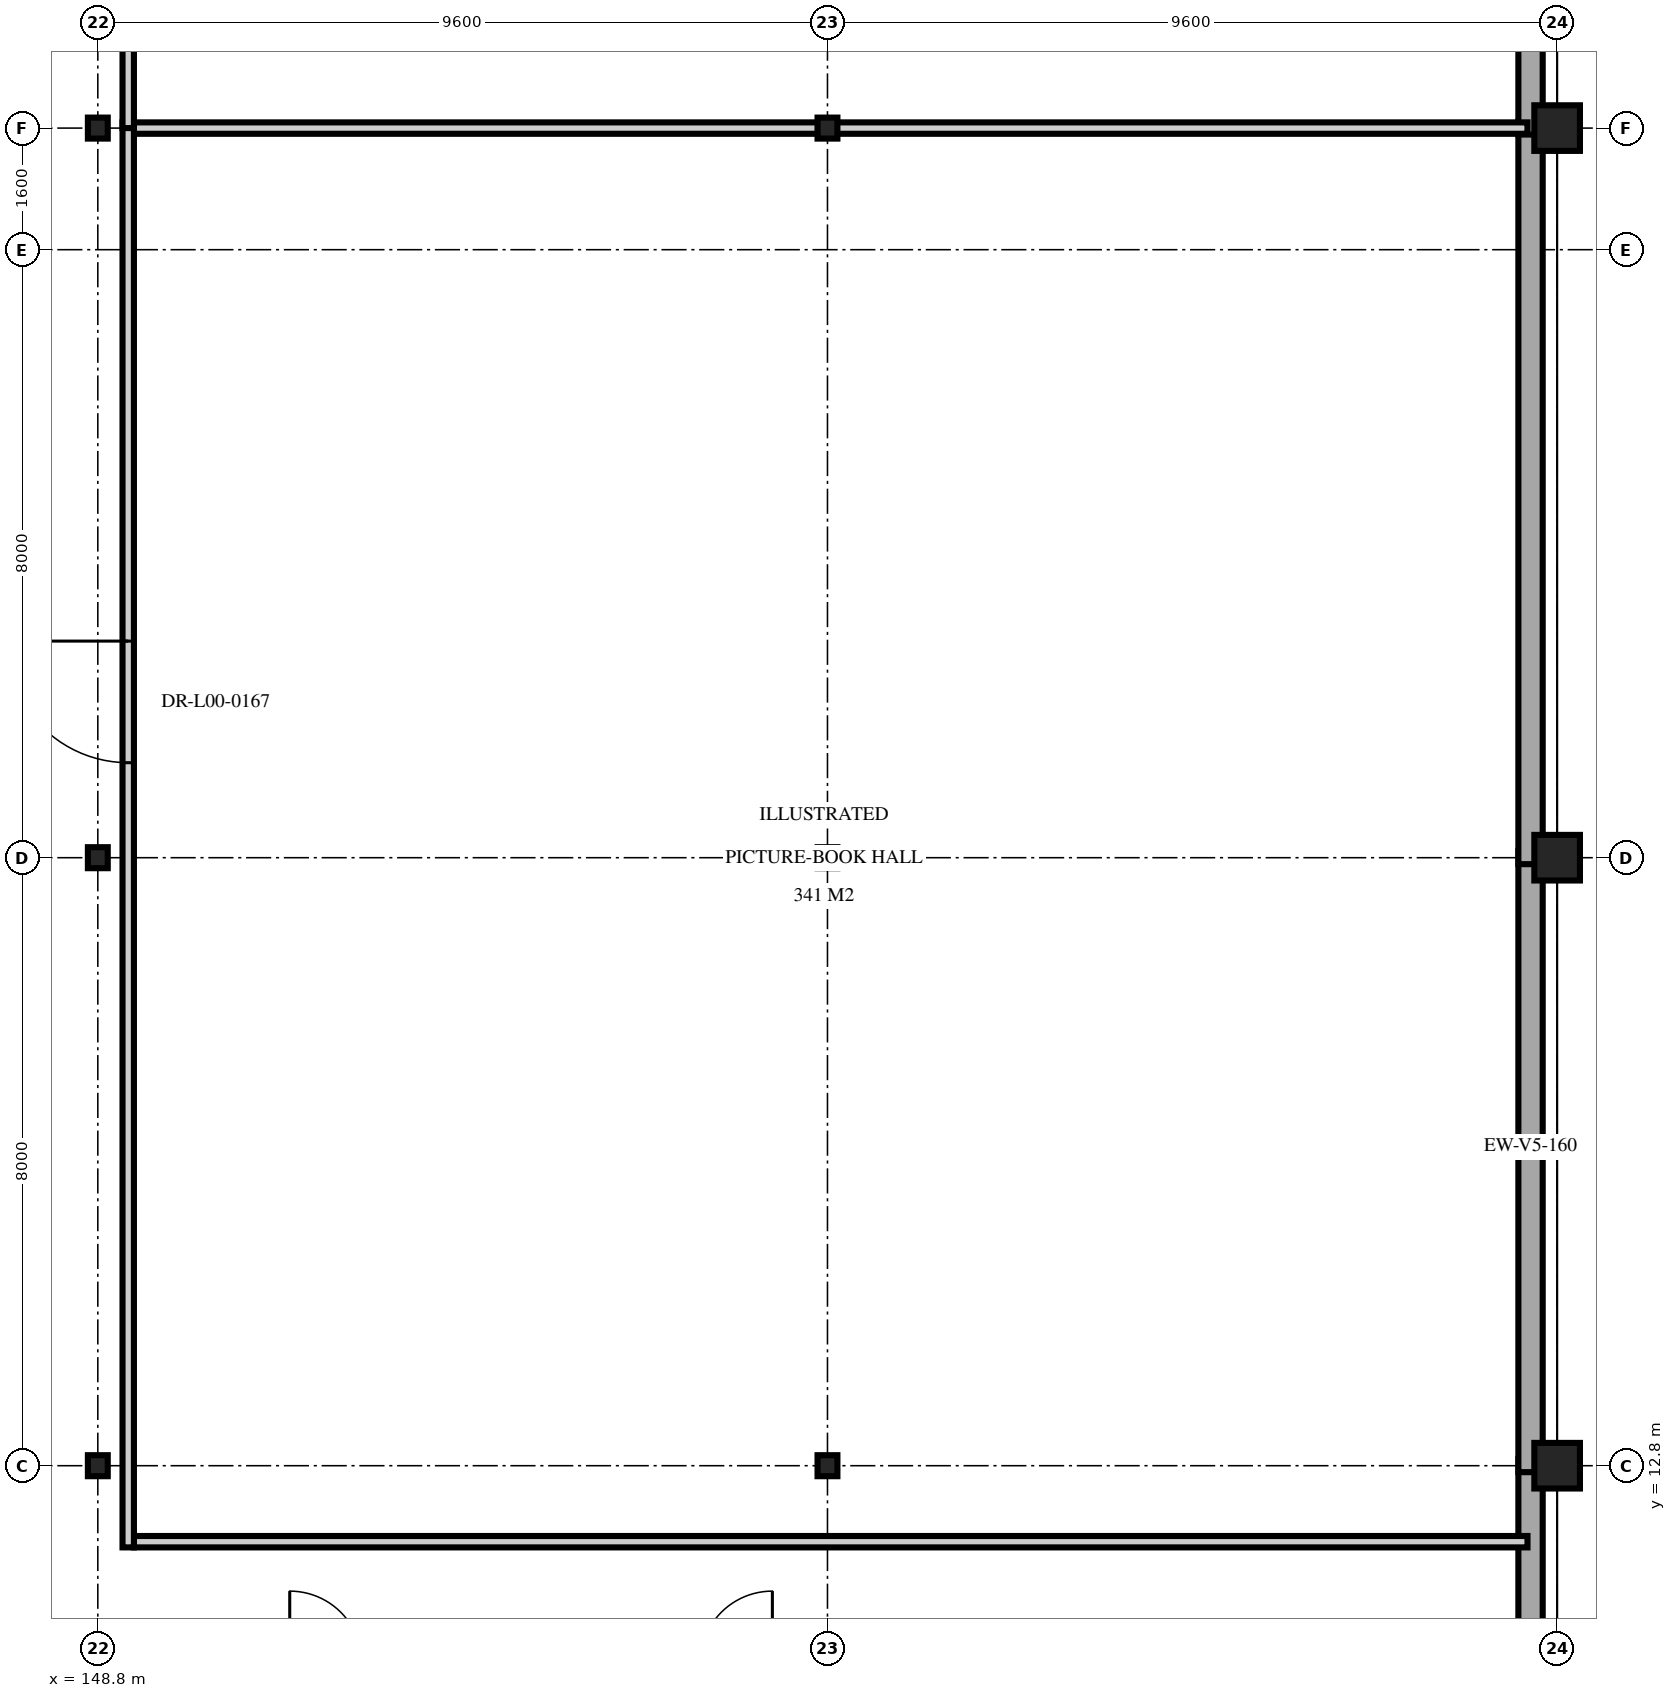
"""IFC4 building model, lengths in metres.
Left out: names, types, materials, properties, quantities, classifications, styles, units other than length and angle.
Written with IfcOpenShell. Run it as: python <this file> out.ifc"""

import sys

from ifc_helpers import new_model, si_unit, direction, frame, frame_2d, origin, origin_2d, place, context, subcontext, project, spatial, rectangle, i_section, extrude, element, fill, save


model = new_model("IFC4")
c1 = context("Model", 3, precision=1e-05, world=origin(), true_north=direction((0.0, 1.0)))
c2 = subcontext(c1, "Body", "Model", "MODEL_VIEW")
j1 = project(units=[si_unit("LENGTHUNIT", "METRE"), si_unit("PLANEANGLEUNIT", "RADIAN")], contexts=[c1])
p1 = place(None, origin())
s1 = spatial("IfcSite", under=j1, at=p1, CompositionType="ELEMENT")
p2 = place(p1, origin())
s2 = spatial("IfcBuilding", under=s1, at=p2, CompositionType="ELEMENT")
p3 = place(p2, origin())
s3 = spatial("IfcBuildingStorey", under=s2, at=p3, CompositionType="ELEMENT", Elevation=0.0)
for number, where, z_axis, x_axis in (
    (1, (148.8, 12.8, 0.0), (0.0, 0.0, 1.0), (1.0, 0.0, 0.0)),
    (2, (148.8, 20.8, 0.0), (0.0, 0.0, 1.0), (1.0, 0.0, 0.0)),
    (3, (148.8, 30.4, 0.0), (0.0, 0.0, 1.0), (1.0, 0.0, 0.0)),
    (4, (158.4, 12.8, 0.0), (0.0, 0.0, 1.0), (1.0, 0.0, 0.0)),
    (5, (158.4, 20.8, 0.0), (0.0, 0.0, 1.0), (1.0, 0.0, 0.0)),
    (6, (158.4, 30.4, 0.0), (0.0, 0.0, 1.0), (1.0, 0.0, 0.0)),
):
    element("IfcColumn", number, at=place(p3, frame(where, z_axis=z_axis, x_axis=x_axis)), inside=s3, PredefinedType="COLUMN", context=c2, shape_type="SweptSolid", body=[
        extrude(i_section(OverallWidth=0.261, OverallDepth=0.276, WebThickness=0.015, FlangeThickness=0.025, at=origin_2d()), origin(), (0.0, 0.0, 1.0), 5.1),
    ])
for number, where, z_axis, x_axis in (
    (7, (168.0, 12.8, 0.0), (0.0, 0.0, 1.0), (1.0, 0.0, 0.0)),
    (8, (168.0, 20.8, 0.0), (0.0, 0.0, 1.0), (1.0, 0.0, 0.0)),
    (9, (168.0, 30.4, 0.0), (0.0, 0.0, 1.0), (1.0, 0.0, 0.0)),
):
    element("IfcColumn", number, at=place(p3, frame(where, z_axis=z_axis, x_axis=x_axis)), inside=s3, PredefinedType="COLUMN", context=c2, shape_type="SweptSolid", body=[
        extrude(rectangle(XDim=0.6, YDim=0.6, at=origin_2d()), origin(), (0.0, 0.0, 1.0), 5.1),
    ])
for number, where, z_axis, x_axis in (
    (10, (167.65, 12.885, 0.0), (0.0, 0.0, 1.0), (0.0, -1.0, 0.0)),
    (11, (167.65, 20.885, 0.0), (0.0, 0.0, 1.0), (0.0, -1.0, 0.0)),
):
    element("IfcWall", number, at=place(p3, frame(where, z_axis=z_axis, x_axis=x_axis)), inside=s3, PredefinedType="SOLIDWALL", context=c2, shape_type="SweptSolid", body=[
        extrude(rectangle(XDim=8.17, YDim=0.32, at=frame_2d((4.085, 0.0))), origin(), (0.0, 0.0, 1.0), 4.442),
    ])
p4 = place(p3, frame((167.65, 30.485, 0.0), z_axis=(0.0, 0.0, 1.0), x_axis=(0.0, -1.0, 0.0)))
e12 = element("IfcWall", 12, at=p4, inside=s3, PredefinedType="SOLIDWALL", context=c2, shape_type="SweptSolid", body=[
    extrude(rectangle(XDim=9.77, YDim=0.32, at=frame_2d((4.885, 0.0))), origin(), (0.0, 0.0, 1.0), 4.442),
])
p5 = place(p3, frame((167.65, 44.885, 0.0), z_axis=(0.0, 0.0, 1.0), x_axis=(0.0, -1.0, 0.0)))
e13 = element("IfcWall", 13, at=p5, inside=s3, PredefinedType="SOLIDWALL", context=c2, shape_type="SweptSolid", body=[
    extrude(rectangle(XDim=14.57, YDim=0.32, at=frame_2d((7.285, 0.0))), origin(), (0.0, 0.0, 1.0), 4.442),
])
for number, where, z_axis, x_axis in (
    (14, (149.275, 11.8, 0.0), (0.0, 0.0, 1.0), (1.0, 0.0, 0.0)),
    (15, (149.275, 30.4, 0.0), (0.0, 0.0, 1.0), (1.0, 0.0, 0.0)),
):
    element("IfcWall", number, at=place(p3, frame(where, z_axis=z_axis, x_axis=x_axis)), inside=s3, PredefinedType="PARTITIONING", context=c2, shape_type="SweptSolid", body=[
        extrude(rectangle(XDim=18.335, YDim=0.15, at=frame_2d((9.167, 0.0))), origin(), (0.0, 0.0, 1.0), 4.442),
    ])
p6 = place(p3, frame((149.2, 11.725, 0.0), z_axis=(0.0, 0.0, 1.0), x_axis=(0.0, 1.0, 0.0)))
e16 = element("IfcWall", 16, at=p6, inside=s3, PredefinedType="PARTITIONING", context=c2, shape_type="SweptSolid", body=[
    extrude(rectangle(XDim=18.75, YDim=0.15, at=frame_2d((9.375, 0.0))), origin(), (0.0, 0.0, 1.0), 4.505),
])
p7 = place(p6, frame((10.325, 0.0, 0.0)))
e17 = element("IfcOpeningElement", 17, at=p7, cuts=e16, PredefinedType="OPENING", context=c2, shape_type="SweptSolid", body=[
    extrude(rectangle(XDim=1.6, YDim=2.25, at=frame_2d((0.8, 1.125))), frame((0.0, 0.085, 0.0), z_axis=(0.0, -1.0, 0.0), x_axis=(1.0, 0.0, 0.0)), (0.0, 0.0, 1.0), 0.17),
])
p8 = place(p3, frame((149.2, 30.4, 0.0), z_axis=(0.0, 0.0, 1.0), x_axis=(0.0, 1.0, 0.0)))
e18 = element("IfcWall", 18, at=p8, inside=s3, PredefinedType="PARTITIONING", context=c2, shape_type="SweptSolid", body=[
    extrude(rectangle(XDim=14.36, YDim=0.15, at=frame_2d((7.18, 0.0))), origin(), (0.0, 0.0, 1.0), 4.505),
])
p9 = place(p8, frame((6.705, 0.0, 0.0)))
e19 = element("IfcOpeningElement", 19, at=p9, cuts=e18, PredefinedType="OPENING", context=c2, shape_type="SweptSolid", body=[
    extrude(rectangle(XDim=0.95, YDim=2.15, at=frame_2d((0.475, 1.075))), frame((0.0, 0.085, 0.0), z_axis=(0.0, -1.0, 0.0), x_axis=(1.0, 0.0, 0.0)), (0.0, 0.0, 1.0), 0.17),
])
p10 = place(p7, origin())
e20 = element("IfcDoor", 20, at=p10, inside=s3, OperationType="DOUBLE_DOOR_SINGLE_SWING", PredefinedType="DOOR", context=c2, shape_type="SweptSolid", body=[
    extrude(rectangle(XDim=1.6, YDim=2.25, at=frame_2d((0.8, 1.125))), frame((0.0, 0.025, 0.0), z_axis=(0.0, -1.0, 0.0), x_axis=(1.0, 0.0, 0.0)), (0.0, 0.0, 1.0), 0.05),
])
fill(e17, e20)
save(model, sys.argv[1])
